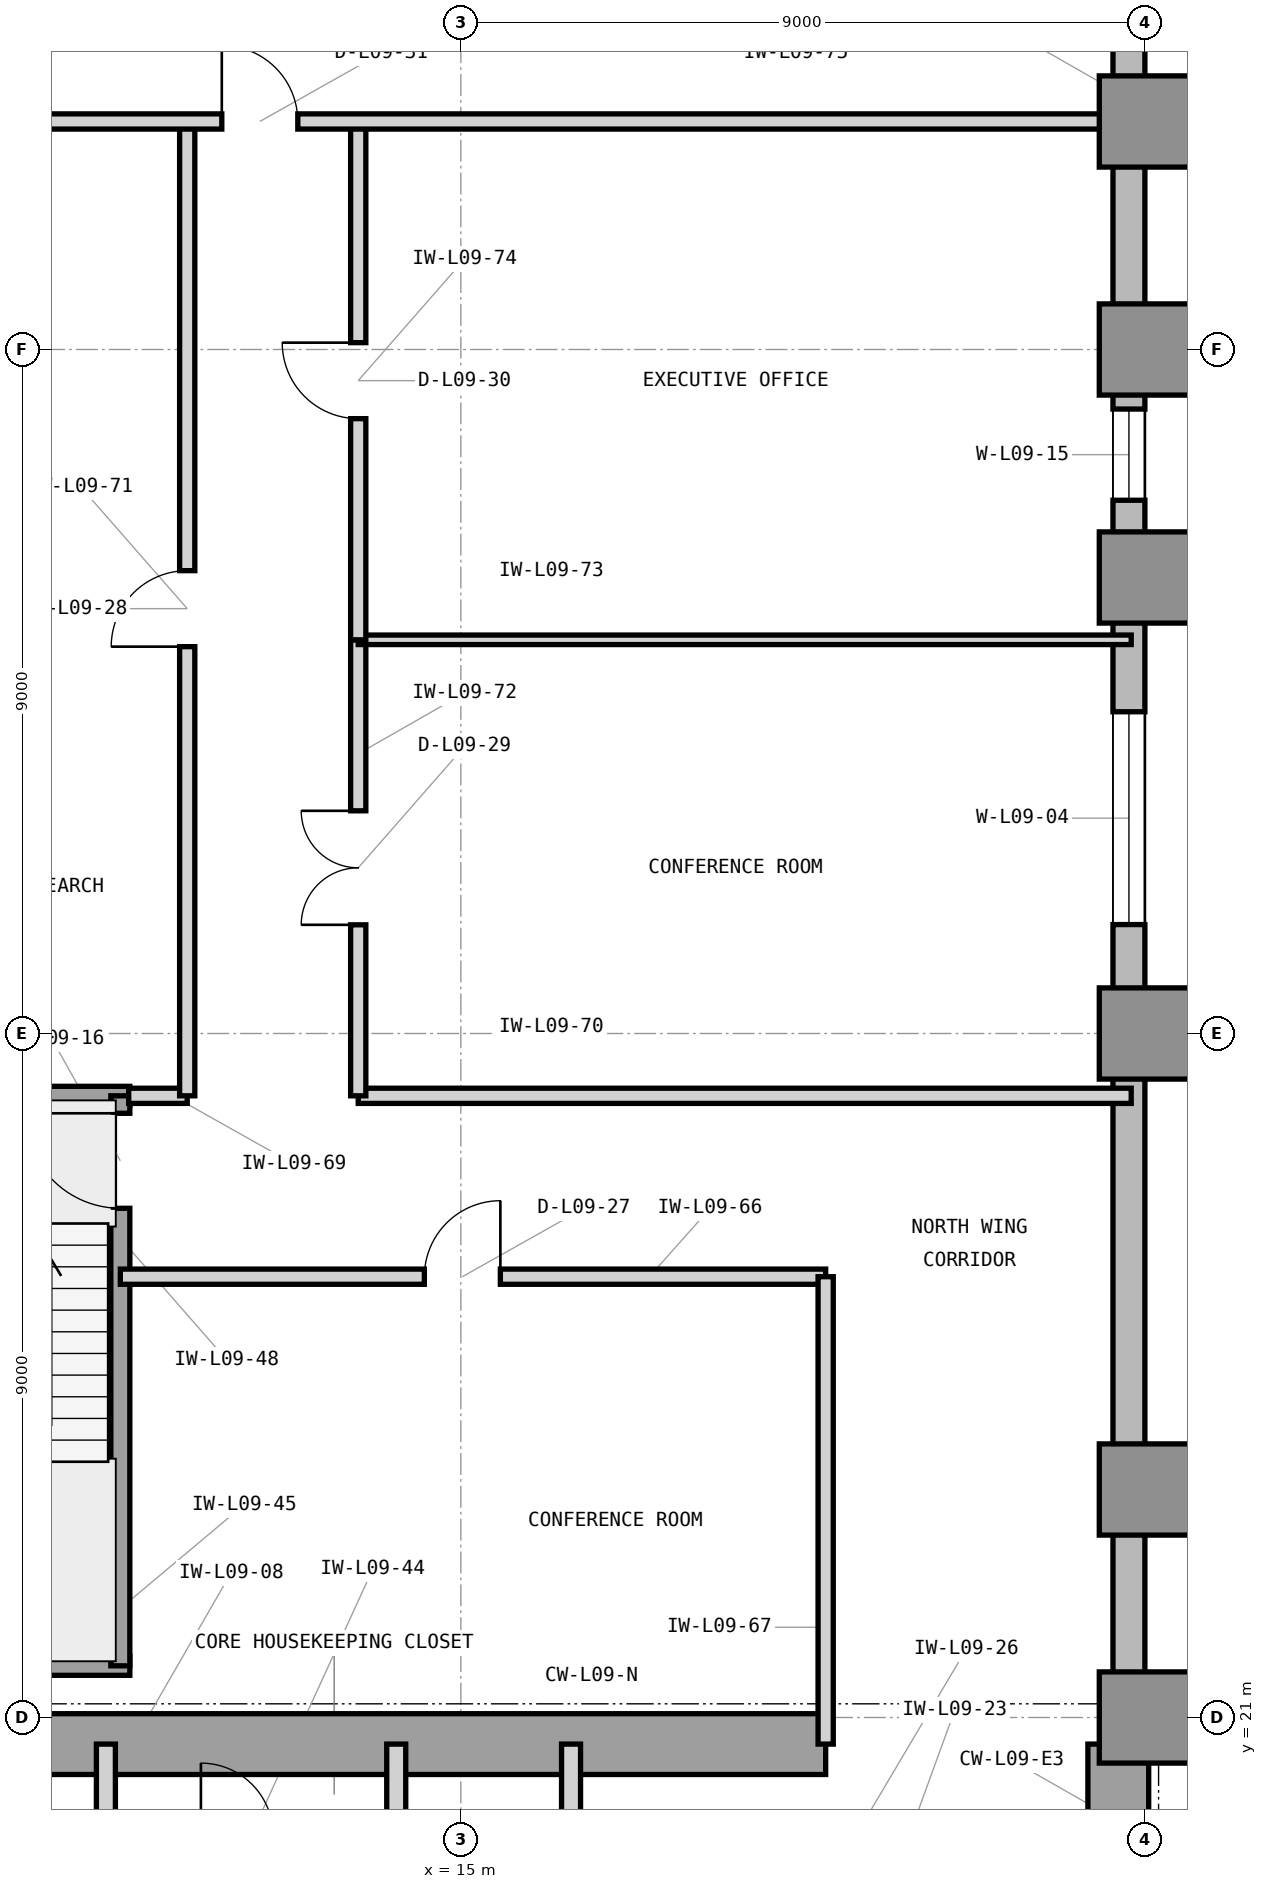
"""IFC4 building model, lengths in metres.
Left out: names, types, materials, properties, quantities, classifications, styles, units other than length and angle.
Written with IfcOpenShell. Run it as: python <this file> out.ifc"""

import sys

from ifc_helpers import new_model, si_unit, direction, frame, frame_2d, origin, origin_2d, place, context, subcontext, project, spatial, rectangle, extrude, element, fill, save


model = new_model("IFC4")
c1 = context("Model", 3, precision=1e-05, world=origin(), true_north=direction((0.0, 1.0)))
c2 = subcontext(c1, "Body", "Model", "MODEL_VIEW")
j1 = project(units=[si_unit("LENGTHUNIT", "METRE"), si_unit("PLANEANGLEUNIT", "RADIAN")], contexts=[c1])
p1 = place(None, origin())
s1 = spatial("IfcSite", under=j1, at=p1, CompositionType="ELEMENT")
p2 = place(p1, origin())
s2 = spatial("IfcBuilding", under=s1, at=p2, CompositionType="ELEMENT")
p3 = place(p2, frame((0.0, 0.0, 42.6)))
s3 = spatial("IfcBuildingStorey", under=s2, at=p3, CompositionType="ELEMENT", Elevation=42.6)
p4 = place(p3, frame((7.475, 20.65, 0.0), z_axis=(0.0, 0.0, 1.0), x_axis=(1.0, 0.0, 0.0)))
e1 = element("IfcWall", 1, at=p4, inside=s3, PredefinedType="SHEAR", context=c2, shape_type="SweptSolid", body=[
    extrude(rectangle(XDim=12.325, YDim=0.8, at=frame_2d((6.163, 0.0))), origin(), (0.0, 0.0, 1.0), 4.2),
])
p5 = place(p3, frame((23.65, 16.6, 0.0), z_axis=(0.0, 0.0, 1.0), x_axis=(0.0, 1.0, 0.0)))
e2 = element("IfcWall", 2, at=p5, inside=s3, PredefinedType="SHEAR", context=c2, shape_type="SweptSolid", body=[
    extrude(rectangle(XDim=4.05, YDim=0.8, at=frame_2d((2.025, 0.0))), origin(), (0.0, 0.0, 1.0), 4.2),
])
for number, where, z_axis, x_axis in (
    (3, (24.0, 21.0, 0.0), (0.0, 0.0, 1.0), (1.0, 0.0, 0.0)),
    (4, (24.0, 24.0, 0.0), (0.0, 0.0, 1.0), (1.0, 0.0, 0.0)),
    (5, (24.0, 30.0, 0.0), (0.0, 0.0, 1.0), (1.0, 0.0, 0.0)),
    (6, (24.0, 36.0, 0.0), (0.0, 0.0, 1.0), (1.0, 0.0, 0.0)),
    (7, (24.0, 39.0, 0.0), (0.0, 0.0, 1.0), (1.0, 0.0, 0.0)),
    (8, (24.0, 42.0, 0.0), (0.0, 0.0, 1.0), (1.0, 0.0, 0.0)),
):
    element("IfcColumn", number, at=place(p3, frame(where, z_axis=z_axis, x_axis=x_axis)), inside=s3, PredefinedType="COLUMN", context=c2, shape_type="SweptSolid", body=[
        extrude(rectangle(XDim=1.2, YDim=1.2, at=origin_2d()), origin(), (0.0, 0.0, 1.0), 4.2),
    ])
p6 = place(p3, frame((64.4, 20.79, 0.0), z_axis=(0.0, 0.0, 1.0), x_axis=(-1.0, 0.0, 0.0)))
e9 = element("IfcWall", 9, at=p6, inside=s3, PredefinedType="STANDARD", context=c2, shape_type="SweptSolid", body=[
    extrude(rectangle(XDim=40.4, YDim=0.42, at=frame_2d((20.2, 0.0))), origin(), (0.0, 0.0, 1.0), 3.98),
])
p7 = place(p6, frame((26.375, 0.0, 0.85)))
e10 = element("IfcOpeningElement", 10, at=p7, cuts=e9, PredefinedType="OPENING", context=c2, shape_type="SweptSolid", body=[
    extrude(rectangle(XDim=2.8, YDim=2.45, at=frame_2d((1.4, 1.225))), frame((0.0, 0.22, 0.0), z_axis=(0.0, -1.0, 0.0), x_axis=(1.0, 0.0, 0.0)), (0.0, 0.0, 1.0), 0.44),
])
p8 = place(p6, frame((38.222, 0.0, 0.85)))
e11 = element("IfcOpeningElement", 11, at=p8, cuts=e9, PredefinedType="OPENING", context=c2, shape_type="SweptSolid", body=[
    extrude(rectangle(XDim=1.2, YDim=2.45, at=frame_2d((0.6, 1.225))), frame((0.0, 0.22, 0.0), z_axis=(0.0, -1.0, 0.0), x_axis=(1.0, 0.0, 0.0)), (0.0, 0.0, 1.0), 0.44),
])
p9 = place(p6, frame((32.536, 0.0, 0.85)))
e12 = element("IfcOpeningElement", 12, at=p9, cuts=e9, PredefinedType="OPENING", context=c2, shape_type="SweptSolid", body=[
    extrude(rectangle(XDim=2.8, YDim=2.45, at=frame_2d((1.4, 1.225))), frame((0.0, 0.22, 0.0), z_axis=(0.0, -1.0, 0.0), x_axis=(1.0, 0.0, 0.0)), (0.0, 0.0, 1.0), 0.44),
])
p10 = place(p6, frame((17.386, 0.0, 0.85)))
e13 = element("IfcOpeningElement", 13, at=p10, cuts=e9, PredefinedType="OPENING", context=c2, shape_type="SweptSolid", body=[
    extrude(rectangle(XDim=2.8, YDim=2.45, at=frame_2d((1.4, 1.225))), frame((0.0, 0.22, 0.0), z_axis=(0.0, -1.0, 0.0), x_axis=(1.0, 0.0, 0.0)), (0.0, 0.0, 1.0), 0.44),
])
p11 = place(p3, frame((23.79, 21.0, 0.0), z_axis=(0.0, 0.0, 1.0), x_axis=(0.0, 1.0, 0.0)))
e14 = element("IfcWall", 14, at=p11, inside=s3, PredefinedType="STANDARD", context=c2, shape_type="SweptSolid", body=[
    extrude(rectangle(XDim=28.4, YDim=0.42, at=frame_2d((14.2, 0.0))), origin(), (0.0, 0.0, 1.0), 3.98),
])
p12 = place(p11, frame((10.433, 0.0, 0.85)))
e15 = element("IfcOpeningElement", 15, at=p12, cuts=e14, PredefinedType="OPENING", context=c2, shape_type="SweptSolid", body=[
    extrude(rectangle(XDim=2.8, YDim=2.45, at=frame_2d((1.4, 1.225))), frame((0.0, 0.22, 0.0), z_axis=(0.0, -1.0, 0.0), x_axis=(1.0, 0.0, 0.0)), (0.0, 0.0, 1.0), 0.44),
])
p13 = place(p11, frame((16.016, 0.0, 0.85)))
e16 = element("IfcOpeningElement", 16, at=p13, cuts=e14, PredefinedType="OPENING", context=c2, shape_type="SweptSolid", body=[
    extrude(rectangle(XDim=1.2, YDim=2.45, at=frame_2d((0.6, 1.225))), frame((0.0, 0.22, 0.0), z_axis=(0.0, -1.0, 0.0), x_axis=(1.0, 0.0, 0.0)), (0.0, 0.0, 1.0), 0.44),
])
p14 = place(p3, frame((10.33, 19.45, 0.0), z_axis=(0.0, 0.0, 1.0), x_axis=(0.0, 1.0, 0.0)))
e17 = element("IfcWall", 17, at=p14, inside=s3, PredefinedType="PARTITIONING", context=c2, shape_type="SweptSolid", body=[
    extrude(rectangle(XDim=1.2, YDim=0.25, at=frame_2d((0.6, 0.0))), origin(), (0.0, 0.0, 1.0), 3.114),
])
for number, where, z_axis, x_axis in (
    (18, (14.15, 16.7, 0.0), (0.0, 0.0, 1.0), (0.0, 1.0, 0.0)),
    (19, (16.45, 16.7, 0.0), (0.0, 0.0, 1.0), (0.0, 1.0, 0.0)),
):
    element("IfcWall", number, at=place(p3, frame(where, z_axis=z_axis, x_axis=x_axis)), inside=s3, PredefinedType="PARTITIONING", context=c2, shape_type="SweptSolid", body=[
        extrude(rectangle(XDim=3.95, YDim=0.25, at=frame_2d((1.975, 0.0))), origin(), (0.0, 0.0, 1.0), 3.97),
    ])
for number, where, z_axis, x_axis in (
    (20, (6.555, 21.68, 0.0), (0.0, 0.0, 1.0), (1.0, 0.0, 0.0)),
    (21, (6.555, 29.18, 0.0), (0.0, 0.0, 1.0), (1.0, 0.0, 0.0)),
):
    element("IfcWall", number, at=place(p3, frame(where, z_axis=z_axis, x_axis=x_axis)), inside=s3, PredefinedType="SHEAR", context=c2, shape_type="SweptSolid", body=[
        extrude(rectangle(XDim=4.09, YDim=0.25, at=frame_2d((2.045, 0.0))), origin(), (0.0, 0.0, 1.0), 4.2),
    ])
p15 = place(p3, frame((10.52, 21.68, 0.0), z_axis=(0.0, 0.0, 1.0), x_axis=(0.0, 1.0, 0.0)))
e22 = element("IfcWall", 22, at=p15, inside=s3, PredefinedType="SHEAR", context=c2, shape_type="SweptSolid", body=[
    extrude(rectangle(XDim=7.5, YDim=0.25, at=frame_2d((3.75, 0.0))), origin(), (0.0, 0.0, 1.0), 4.2),
])
p16 = place(p15, frame((6.02, 0.0, 0.0)))
e23 = element("IfcOpeningElement", 23, at=p16, cuts=e22, PredefinedType="OPENING", context=c2, shape_type="SweptSolid", body=[
    extrude(rectangle(XDim=1.25, YDim=2.2, at=frame_2d((0.625, 1.1))), frame((0.0, 0.135, 0.0), z_axis=(0.0, -1.0, 0.0), x_axis=(1.0, 0.0, 0.0)), (0.0, 0.0, 1.0), 0.27),
])
p17 = place(p3, frame((10.52, 26.8, 0.0), z_axis=(0.0, 0.0, 1.0), x_axis=(1.0, 0.0, 0.0)))
e24 = element("IfcWall", 24, at=p17, inside=s3, PredefinedType="PARTITIONING", context=c2, shape_type="SweptSolid", body=[
    extrude(rectangle(XDim=9.28, YDim=0.2, at=frame_2d((4.64, 0.0))), origin(), (0.0, 0.0, 1.0), 3.97),
])
p18 = place(p17, frame((4.0, 0.0, 0.0)))
e25 = element("IfcOpeningElement", 25, at=p18, cuts=e24, PredefinedType="OPENING", context=c2, shape_type="SweptSolid", body=[
    extrude(rectangle(XDim=1.0, YDim=2.15, at=frame_2d((0.5, 1.075))), frame((0.0, 0.11, 0.0), z_axis=(0.0, -1.0, 0.0), x_axis=(1.0, 0.0, 0.0)), (0.0, 0.0, 1.0), 0.22),
])
p19 = place(p3, frame((19.8, 20.65, 0.0), z_axis=(0.0, 0.0, 1.0), x_axis=(0.0, 1.0, 0.0)))
e26 = element("IfcWall", 26, at=p19, inside=s3, PredefinedType="PARTITIONING", context=c2, shape_type="SweptSolid", body=[
    extrude(rectangle(XDim=6.15, YDim=0.2, at=frame_2d((3.075, 0.0))), origin(), (0.0, 0.0, 1.0), 3.97),
])
p20 = place(p3, frame((10.63, 29.18, 0.0), z_axis=(0.0, 0.0, 1.0), x_axis=(1.0, 0.0, 0.0)))
e27 = element("IfcWall", 27, at=p20, inside=s3, PredefinedType="PARTITIONING", context=c2, shape_type="SweptSolid", body=[
    extrude(rectangle(XDim=0.77, YDim=0.2, at=frame_2d((0.385, 0.0))), origin(), (0.0, 0.0, 1.0), 3.97),
])
p21 = place(p3, frame((13.65, 29.18, 0.0), z_axis=(0.0, 0.0, 1.0), x_axis=(1.0, 0.0, 0.0)))
e28 = element("IfcWall", 28, at=p21, inside=s3, PredefinedType="PARTITIONING", context=c2, shape_type="SweptSolid", body=[
    extrude(rectangle(XDim=10.17, YDim=0.2, at=frame_2d((5.085, 0.0))), origin(), (0.0, 0.0, 1.0), 3.97),
])
p22 = place(p3, frame((11.4, 29.18, 0.0), z_axis=(0.0, 0.0, 1.0), x_axis=(0.0, 1.0, 0.0)))
e29 = element("IfcWall", 29, at=p22, inside=s3, PredefinedType="PARTITIONING", context=c2, shape_type="SweptSolid", body=[
    extrude(rectangle(XDim=12.82, YDim=0.2, at=frame_2d((6.41, 0.0))), origin(), (0.0, 0.0, 1.0), 3.97),
])
p23 = place(p22, frame((5.91, 0.0, 0.0)))
e30 = element("IfcOpeningElement", 30, at=p23, cuts=e29, PredefinedType="OPENING", context=c2, shape_type="SweptSolid", body=[
    extrude(rectangle(XDim=1.0, YDim=2.15, at=frame_2d((0.5, 1.075))), frame((0.0, 0.11, 0.0), z_axis=(0.0, -1.0, 0.0), x_axis=(1.0, 0.0, 0.0)), (0.0, 0.0, 1.0), 0.22),
])
p24 = place(p3, frame((13.65, 29.18, 0.0), z_axis=(0.0, 0.0, 1.0), x_axis=(0.0, 1.0, 0.0)))
e31 = element("IfcWall", 31, at=p24, inside=s3, PredefinedType="PARTITIONING", context=c2, shape_type="SweptSolid", body=[
    extrude(rectangle(XDim=6.0, YDim=0.2, at=frame_2d((3.0, 0.0))), origin(), (0.0, 0.0, 1.0), 3.97),
])
p25 = place(p24, frame((2.25, 0.0, 0.0)))
e32 = element("IfcOpeningElement", 32, at=p25, cuts=e31, PredefinedType="OPENING", context=c2, shape_type="SweptSolid", body=[
    extrude(rectangle(XDim=1.5, YDim=2.3, at=frame_2d((0.75, 1.15))), frame((0.0, 0.11, 0.0), z_axis=(0.0, -1.0, 0.0), x_axis=(1.0, 0.0, 0.0)), (0.0, 0.0, 1.0), 0.22),
])
p26 = place(p3, frame((13.65, 35.18, 0.0), z_axis=(0.0, 0.0, 1.0), x_axis=(1.0, 0.0, 0.0)))
e33 = element("IfcWall", 33, at=p26, inside=s3, PredefinedType="PARTITIONING", context=c2, shape_type="SweptSolid", body=[
    extrude(rectangle(XDim=10.17, YDim=0.125, at=frame_2d((5.085, 0.0))), origin(), (0.0, 0.0, 1.0), 3.97),
])
p27 = place(p3, frame((13.65, 35.18, 0.0), z_axis=(0.0, 0.0, 1.0), x_axis=(0.0, 1.0, 0.0)))
e34 = element("IfcWall", 34, at=p27, inside=s3, PredefinedType="PARTITIONING", context=c2, shape_type="SweptSolid", body=[
    extrude(rectangle(XDim=6.82, YDim=0.2, at=frame_2d((3.41, 0.0))), origin(), (0.0, 0.0, 1.0), 3.97),
])
p28 = place(p27, frame((2.91, 0.0, 0.0)))
e35 = element("IfcOpeningElement", 35, at=p28, cuts=e34, PredefinedType="OPENING", context=c2, shape_type="SweptSolid", body=[
    extrude(rectangle(XDim=1.0, YDim=2.15, at=frame_2d((0.5, 1.075))), frame((0.0, 0.11, 0.0), z_axis=(0.0, -1.0, 0.0), x_axis=(1.0, 0.0, 0.0)), (0.0, 0.0, 1.0), 0.22),
])
p29 = place(p3, frame((6.18, 42.0, 0.0), z_axis=(0.0, 0.0, 1.0), x_axis=(1.0, 0.0, 0.0)))
e36 = element("IfcWall", 36, at=p29, inside=s3, PredefinedType="PARTITIONING", context=c2, shape_type="SweptSolid", body=[
    extrude(rectangle(XDim=17.64, YDim=0.2, at=frame_2d((8.82, 0.0))), origin(), (0.0, 0.0, 1.0), 3.114),
])
p30 = place(p29, frame((5.675, 0.0, 0.0)))
e37 = element("IfcOpeningElement", 37, at=p30, cuts=e36, PredefinedType="OPENING", context=c2, shape_type="SweptSolid", body=[
    extrude(rectangle(XDim=1.0, YDim=2.15, at=frame_2d((0.5, 1.075))), frame((0.0, 0.11, 0.0), z_axis=(0.0, -1.0, 0.0), x_axis=(1.0, 0.0, 0.0)), (0.0, 0.0, 1.0), 0.22),
])
p31 = place(p12, origin())
e38 = element("IfcWindow", 38, at=p31, inside=s3, PartitioningType="SINGLE_PANEL", PredefinedType="WINDOW", context=c2, shape_type="SweptSolid", body=[
    extrude(rectangle(XDim=2.8, YDim=2.45, at=frame_2d((1.4, 1.225))), frame((0.0, 0.11, 0.0), z_axis=(0.0, -1.0, 0.0), x_axis=(1.0, 0.0, 0.0)), (0.0, 0.0, 1.0), 0.06),
])
fill(e15, e38)
p32 = place(p16, origin())
e39 = element("IfcDoor", 39, at=p32, inside=s3, OperationType="SINGLE_SWING_RIGHT", PredefinedType="DOOR", context=c2, shape_type="SweptSolid", body=[
    extrude(rectangle(XDim=1.25, YDim=2.2, at=frame_2d((0.625, 1.1))), frame((0.0, 0.025, 0.0), z_axis=(0.0, -1.0, 0.0), x_axis=(1.0, 0.0, 0.0)), (0.0, 0.0, 1.0), 0.05),
])
fill(e23, e39)
p33 = place(p18, origin())
e40 = element("IfcDoor", 40, at=p33, inside=s3, OperationType="SINGLE_SWING_RIGHT", PredefinedType="DOOR", context=c2, shape_type="SweptSolid", body=[
    extrude(rectangle(XDim=1.0, YDim=2.15, at=frame_2d((0.5, 1.075))), frame((0.0, 0.025, 0.0), z_axis=(0.0, -1.0, 0.0), x_axis=(1.0, 0.0, 0.0)), (0.0, 0.0, 1.0), 0.05),
])
fill(e25, e40)
p34 = place(p23, origin())
e41 = element("IfcDoor", 41, at=p34, inside=s3, OperationType="SINGLE_SWING_LEFT", PredefinedType="DOOR", context=c2, shape_type="SweptSolid", body=[
    extrude(rectangle(XDim=1.0, YDim=2.15, at=frame_2d((0.5, 1.075))), frame((0.0, 0.025, 0.0), z_axis=(0.0, -1.0, 0.0), x_axis=(1.0, 0.0, 0.0)), (0.0, 0.0, 1.0), 0.05),
])
fill(e30, e41)
p35 = place(p25, origin())
e42 = element("IfcDoor", 42, at=p35, inside=s3, OperationType="DOUBLE_DOOR_SINGLE_SWING", PredefinedType="DOOR", context=c2, shape_type="SweptSolid", body=[
    extrude(rectangle(XDim=1.5, YDim=2.3, at=frame_2d((0.75, 1.15))), frame((0.0, 0.025, 0.0), z_axis=(0.0, -1.0, 0.0), x_axis=(1.0, 0.0, 0.0)), (0.0, 0.0, 1.0), 0.05),
])
fill(e32, e42)
p36 = place(p28, origin())
e43 = element("IfcDoor", 43, at=p36, inside=s3, OperationType="SINGLE_SWING_RIGHT", PredefinedType="DOOR", context=c2, shape_type="SweptSolid", body=[
    extrude(rectangle(XDim=1.0, YDim=2.15, at=frame_2d((0.5, 1.075))), frame((0.0, 0.025, 0.0), z_axis=(0.0, -1.0, 0.0), x_axis=(1.0, 0.0, 0.0)), (0.0, 0.0, 1.0), 0.05),
])
fill(e35, e43)
p37 = place(p30, origin())
e44 = element("IfcDoor", 44, at=p37, inside=s3, OperationType="SINGLE_SWING_LEFT", PredefinedType="DOOR", context=c2, shape_type="SweptSolid", body=[
    extrude(rectangle(XDim=1.0, YDim=2.15, at=frame_2d((0.5, 1.075))), frame((0.0, 0.025, 0.0), z_axis=(0.0, -1.0, 0.0), x_axis=(1.0, 0.0, 0.0)), (0.0, 0.0, 1.0), 0.05),
])
fill(e37, e44)
p38 = place(p13, origin())
e45 = element("IfcWindow", 45, at=p38, inside=s3, PartitioningType="SINGLE_PANEL", PredefinedType="WINDOW", context=c2, shape_type="SweptSolid", body=[
    extrude(rectangle(XDim=1.2, YDim=2.45, at=frame_2d((0.6, 1.225))), frame((0.0, 0.11, 0.0), z_axis=(0.0, -1.0, 0.0), x_axis=(1.0, 0.0, 0.0)), (0.0, 0.0, 1.0), 0.06),
])
fill(e16, e45)
save(model, sys.argv[1])
